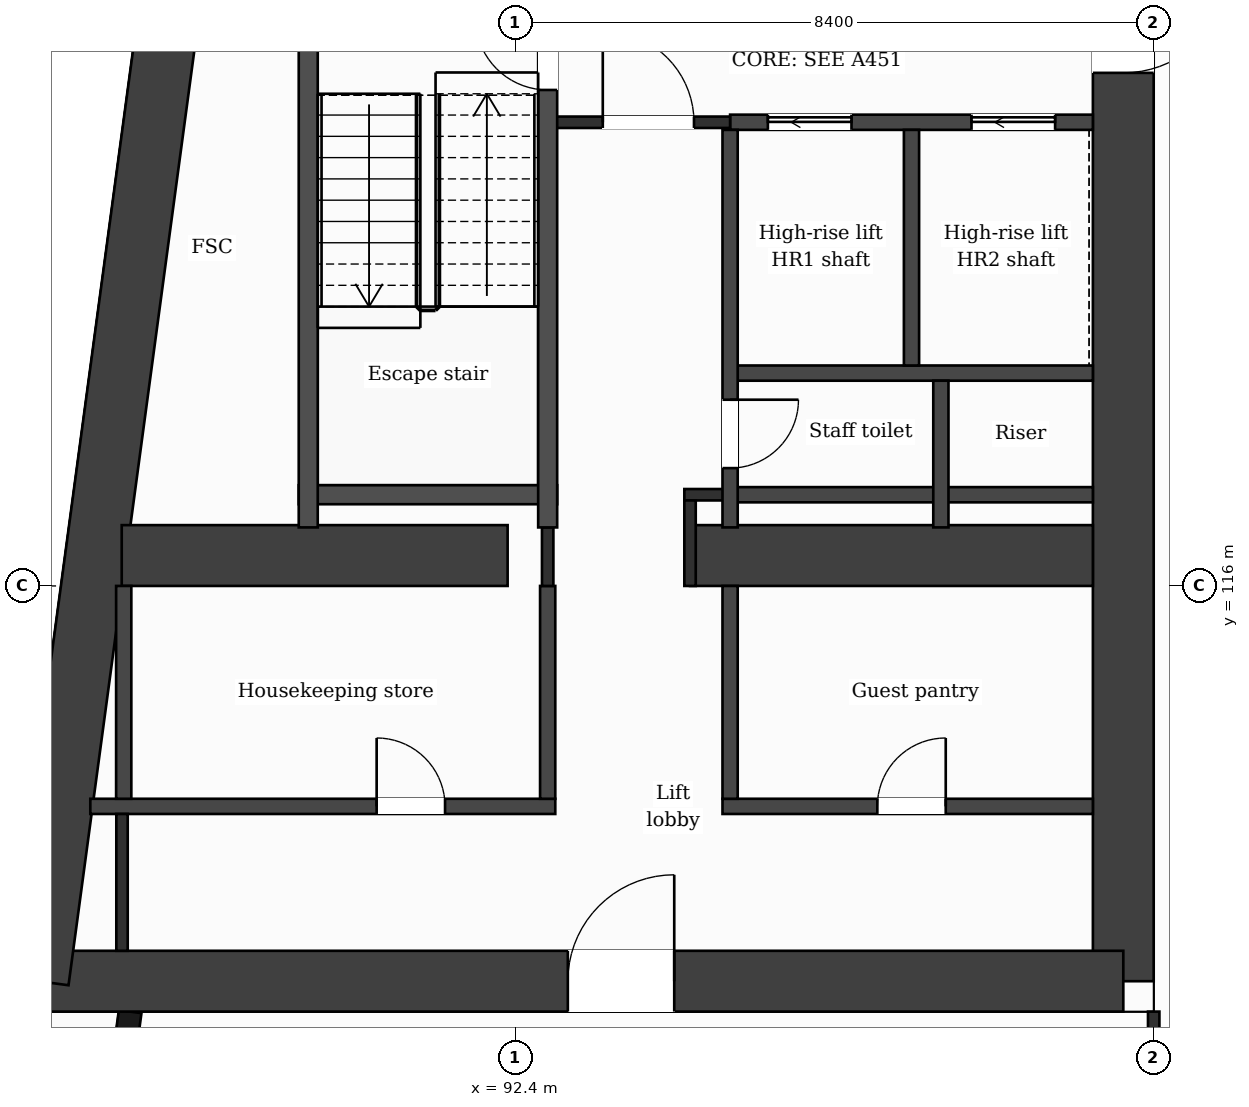
"""IFC4 building model, lengths in metres.
Left out: names, types, materials, properties, quantities, classifications, styles, units other than length and angle.
Written with IfcOpenShell. Run it as: python <this file> out.ifc"""

import sys

from ifc_helpers import new_model, si_unit, direction, frame, frame_2d, origin, place, context, subcontext, project, spatial, rectangle, extrude, element, fill, save


model = new_model("IFC4")
c1 = context("Model", 3, precision=1e-05, world=origin(), true_north=direction((0.0, 1.0)))
c2 = subcontext(c1, "Body", "Model", "MODEL_VIEW")
j1 = project(units=[si_unit("LENGTHUNIT", "METRE"), si_unit("PLANEANGLEUNIT", "RADIAN")], contexts=[c1])
p1 = place(None, origin())
s1 = spatial("IfcSite", under=j1, at=p1, CompositionType="ELEMENT")
p2 = place(p1, origin())
s2 = spatial("IfcBuilding", under=s1, at=p2, CompositionType="ELEMENT")
p3 = place(p2, frame((0.0, 0.0, 209.6)))
s3 = spatial("IfcBuildingStorey", under=s2, at=p3, CompositionType="ELEMENT", Elevation=209.6)
p4 = place(p3, frame((100.4, 132.0, 0.0), z_axis=(0.0, 0.0, 1.0), x_axis=(0.0, -1.0, 0.0)))
e1 = element("IfcWall", 1, at=p4, inside=s3, PredefinedType="SHEAR", context=c2, shape_type="SweptSolid", body=[
    extrude(rectangle(XDim=21.2, YDim=0.8, at=frame_2d((10.6, 0.0))), origin(), (0.0, 0.0, 1.0), 3.7),
])
p5 = place(p4, frame((7.85, 0.0, 0.0)))
e2 = element("IfcOpeningElement", 2, at=p5, cuts=e1, PredefinedType="OPENING", context=c2, shape_type="SweptSolid", body=[
    extrude(rectangle(XDim=1.4, YDim=2.1, at=frame_2d((0.7, 1.05))), frame((0.0, 0.41, 0.0), z_axis=(0.0, -1.0, 0.0), x_axis=(1.0, 0.0, 0.0)), (0.0, 0.0, 1.0), 0.82),
])
p6 = place(p3, frame((100.4, 110.8, 0.0), z_axis=(0.0, 0.0, 1.0), x_axis=(-1.0, 0.0, 0.0)))
e3 = element("IfcWall", 3, at=p6, inside=s3, PredefinedType="SHEAR", context=c2, shape_type="SweptSolid", body=[
    extrude(rectangle(XDim=14.273, YDim=0.8, at=frame_2d((7.137, 0.0))), origin(), (0.0, 0.0, 1.0), 3.7),
])
p7 = place(p6, frame((5.908, 0.0, 0.0)))
e4 = element("IfcOpeningElement", 4, at=p7, cuts=e3, PredefinedType="OPENING", context=c2, shape_type="SweptSolid", body=[
    extrude(rectangle(XDim=1.4, YDim=2.1, at=frame_2d((0.7, 1.05))), frame((0.0, 0.41, 0.0), z_axis=(0.0, -1.0, 0.0), x_axis=(1.0, 0.0, 0.0)), (0.0, 0.0, 1.0), 0.82),
])
p8 = place(p3, frame((86.127, 110.8, 0.0), z_axis=(0.0, 0.0, 1.0), x_axis=(0.133408347329, 0.991061154956, 0.0)))
e5 = element("IfcWall", 5, at=p8, inside=s3, PredefinedType="SHEAR", context=c2, shape_type="SweptSolid", body=[
    extrude(rectangle(XDim=21.391, YDim=0.8, at=frame_2d((10.696, 0.0))), origin(), (0.0, 0.0, 1.0), 3.7),
])
p9 = place(p3, frame((87.223, 116.4, 0.0), z_axis=(0.0, 0.0, 1.0), x_axis=(1.0, 0.0, 0.0)))
e6 = element("IfcWall", 6, at=p9, inside=s3, PredefinedType="SHEAR", context=c2, shape_type="SweptSolid", body=[
    extrude(rectangle(XDim=5.077, YDim=0.8, at=frame_2d((2.539, 0.0))), origin(), (0.0, 0.0, 1.0), 3.7),
])
p10 = place(p3, frame((94.7, 116.4, 0.0), z_axis=(0.0, 0.0, 1.0), x_axis=(1.0, 0.0, 0.0)))
e7 = element("IfcWall", 7, at=p10, inside=s3, PredefinedType="SHEAR", context=c2, shape_type="SweptSolid", body=[
    extrude(rectangle(XDim=5.3, YDim=0.8, at=frame_2d((2.65, 0.0))), origin(), (0.0, 0.0, 1.0), 3.7),
])
p11 = place(p3, frame((87.334, 110.4, 0.0), z_axis=(0.0, 0.0, 1.0), x_axis=(-0.133437175554, -0.991057273915, 0.0)))
e8 = element("IfcWall", 8, at=p11, inside=s3, PredefinedType="SOLIDWALL", context=c2, shape_type="SweptSolid", body=[
    extrude(rectangle(XDim=6.781, YDim=0.3, at=frame_2d((3.39, 0.0))), origin(), (0.0, 0.0, 1.0), 3.38),
])
p12 = place(p11, frame((1.418, 0.0, 0.0)))
e9 = element("IfcOpeningElement", 9, at=p12, cuts=e8, PredefinedType="OPENING", context=c2, shape_type="SweptSolid", body=[
    extrude(rectangle(XDim=1.2, YDim=2.4, at=frame_2d((0.6, 1.2))), frame((0.0, 0.16, 0.0), z_axis=(0.0, -1.0, 0.0), x_axis=(1.0, 0.0, 0.0)), (0.0, 0.0, 1.0), 0.32),
])
p13 = place(p11, frame((4.758, 0.0, 0.9)))
e10 = element("IfcOpeningElement", 10, at=p13, cuts=e8, PredefinedType="OPENING", context=c2, shape_type="SweptSolid", body=[
    extrude(rectangle(XDim=1.2, YDim=2.1, at=frame_2d((0.6, 1.05))), frame((0.0, 0.16, 0.0), z_axis=(0.0, -1.0, 0.0), x_axis=(1.0, 0.0, 0.0)), (0.0, 0.0, 1.0), 0.32),
])
p14 = place(p3, frame((86.81, 113.1, 0.0), z_axis=(0.0, 0.0, 1.0), x_axis=(1.0, 0.0, 0.0)))
e11 = element("IfcWall", 11, at=p14, inside=s3, PredefinedType="PARTITIONING", context=c2, shape_type="SweptSolid", body=[
    extrude(rectangle(XDim=6.117, YDim=0.2, at=frame_2d((3.059, 0.0))), origin(), (0.0, 0.0, 1.0), 3.38),
])
p15 = place(p14, frame((3.767, 0.0, 0.0)))
e12 = element("IfcOpeningElement", 12, at=p15, cuts=e11, PredefinedType="OPENING", context=c2, shape_type="SweptSolid", body=[
    extrude(rectangle(XDim=0.9, YDim=2.1, at=frame_2d((0.45, 1.05))), frame((0.0, 0.11, 0.0), z_axis=(0.0, -1.0, 0.0), x_axis=(1.0, 0.0, 0.0)), (0.0, 0.0, 1.0), 0.22),
])
p16 = place(p3, frame((95.127, 113.1, 0.0), z_axis=(0.0, 0.0, 1.0), x_axis=(1.0, 0.0, 0.0)))
e13 = element("IfcWall", 13, at=p16, inside=s3, PredefinedType="PARTITIONING", context=c2, shape_type="SweptSolid", body=[
    extrude(rectangle(XDim=4.873, YDim=0.2, at=frame_2d((2.437, 0.0))), origin(), (0.0, 0.0, 1.0), 3.38),
])
p17 = place(p16, frame((2.037, 0.0, 0.0)))
e14 = element("IfcOpeningElement", 14, at=p17, cuts=e13, PredefinedType="OPENING", context=c2, shape_type="SweptSolid", body=[
    extrude(rectangle(XDim=0.9, YDim=2.1, at=frame_2d((0.45, 1.05))), frame((0.0, 0.11, 0.0), z_axis=(0.0, -1.0, 0.0), x_axis=(1.0, 0.0, 0.0)), (0.0, 0.0, 1.0), 0.22),
])
p18 = place(p3, frame((95.227, 117.2, 0.0), z_axis=(0.0, 0.0, 1.0), x_axis=(1.0, 0.0, 0.0)))
e15 = element("IfcWall", 15, at=p18, inside=s3, PredefinedType="PARTITIONING", context=c2, shape_type="SweptSolid", body=[
    extrude(rectangle(XDim=4.773, YDim=0.2, at=frame_2d((2.386, 0.0))), origin(), (0.0, 0.0, 1.0), 3.38),
])
p19 = place(p3, frame((94.625, 117.2, 0.0), z_axis=(0.0, 0.0, 1.0), x_axis=(1.0, 0.0, 0.0)))
e16 = element("IfcWall", 16, at=p19, inside=s3, PredefinedType="PARTITIONING", context=c2, shape_type="SweptSolid", body=[
    extrude(rectangle(XDim=0.602, YDim=0.15, at=frame_2d((0.301, 0.0))), origin(), (0.0, 0.0, 1.0), 3.38),
])
p20 = place(p3, frame((89.552, 117.2, 0.0), z_axis=(0.0, 0.0, 1.0), x_axis=(1.0, 0.0, 0.0)))
e17 = element("IfcWall", 17, at=p20, inside=s3, PredefinedType="PARTITIONING", context=c2, shape_type="SweptSolid", body=[
    extrude(rectangle(XDim=3.4, YDim=0.25, at=frame_2d((1.7, 0.0))), origin(), (0.0, 0.0, 1.0), 3.38),
])
p21 = place(p3, frame((95.227, 118.8, 0.0), z_axis=(0.0, 0.0, 1.0), x_axis=(1.0, 0.0, 0.0)))
e18 = element("IfcWall", 18, at=p21, inside=s3, PredefinedType="PARTITIONING", context=c2, shape_type="SweptSolid", body=[
    extrude(rectangle(XDim=4.773, YDim=0.2, at=frame_2d((2.386, 0.0))), origin(), (0.0, 0.0, 1.0), 3.38),
])
p22 = place(p3, frame((95.227, 122.1, 0.0), z_axis=(0.0, 0.0, 1.0), x_axis=(1.0, 0.0, 0.0)))
e19 = element("IfcWall", 19, at=p22, inside=s3, PredefinedType="PARTITIONING", context=c2, shape_type="SweptSolid", body=[
    extrude(rectangle(XDim=4.773, YDim=0.2, at=frame_2d((2.386, 0.0))), origin(), (0.0, 0.0, 1.0), 3.38),
])
p23 = place(p22, frame((0.497, 0.0, 0.0)))
e20 = element("IfcOpeningElement", 20, at=p23, cuts=e19, PredefinedType="OPENING", context=c2, shape_type="SweptSolid", body=[
    extrude(rectangle(XDim=1.1, YDim=2.1, at=frame_2d((0.55, 1.05))), frame((0.0, 0.11, 0.0), z_axis=(0.0, -1.0, 0.0), x_axis=(1.0, 0.0, 0.0)), (0.0, 0.0, 1.0), 0.22),
])
p24 = place(p22, frame((3.176, 0.0, 0.0)))
e21 = element("IfcOpeningElement", 21, at=p24, cuts=e19, PredefinedType="OPENING", context=c2, shape_type="SweptSolid", body=[
    extrude(rectangle(XDim=1.1, YDim=2.1, at=frame_2d((0.55, 1.05))), frame((0.0, 0.11, 0.0), z_axis=(0.0, -1.0, 0.0), x_axis=(1.0, 0.0, 0.0)), (0.0, 0.0, 1.0), 0.22),
])
p25 = place(p3, frame((92.827, 122.1, 0.0), z_axis=(0.0, 0.0, 1.0), x_axis=(1.0, 0.0, 0.0)))
e22 = element("IfcWall", 22, at=p25, inside=s3, PredefinedType="PARTITIONING", context=c2, shape_type="SweptSolid", body=[
    extrude(rectangle(XDim=2.4, YDim=0.15, at=frame_2d((1.2, 0.0))), origin(), (0.0, 0.0, 1.0), 3.38),
])
p26 = place(p25, frame((0.725, 0.0, 0.0)))
e23 = element("IfcOpeningElement", 23, at=p26, cuts=e22, PredefinedType="OPENING", context=c2, shape_type="SweptSolid", body=[
    extrude(rectangle(XDim=1.2, YDim=2.1, at=frame_2d((0.6, 1.05))), frame((0.0, 0.085, 0.0), z_axis=(0.0, -1.0, 0.0), x_axis=(1.0, 0.0, 0.0)), (0.0, 0.0, 1.0), 0.17),
])
p27 = place(p3, frame((87.25, 113.2, 0.0), z_axis=(0.0, 0.0, 1.0), x_axis=(0.0, 1.0, 0.0)))
e24 = element("IfcWall", 24, at=p27, inside=s3, PredefinedType="PARTITIONING", context=c2, shape_type="SweptSolid", body=[
    extrude(rectangle(XDim=2.8, YDim=0.2, at=frame_2d((1.4, 0.0))), origin(), (0.0, 0.0, 1.0), 3.38),
])
p28 = place(p3, frame((87.227, 111.2, 0.0), z_axis=(0.0, 0.0, 1.0), x_axis=(0.0, 1.0, 0.0)))
e25 = element("IfcWall", 25, at=p28, inside=s3, PredefinedType="PARTITIONING", context=c2, shape_type="SweptSolid", body=[
    extrude(rectangle(XDim=1.8, YDim=0.15, at=frame_2d((0.9, 0.0))), origin(), (0.0, 0.0, 1.0), 3.38),
])
p29 = place(p3, frame((89.677, 116.77, 0.0), z_axis=(0.0, 0.0, 1.0), x_axis=(0.0, 1.0, 0.0)))
e26 = element("IfcWall", 26, at=p29, inside=s3, PredefinedType="PARTITIONING", context=c2, shape_type="SweptSolid", body=[
    extrude(rectangle(XDim=7.055, YDim=0.25, at=frame_2d((3.527, 0.0))), origin(), (0.0, 0.0, 1.0), 3.38),
])
p30 = place(p3, frame((92.827, 113.2, 0.0), z_axis=(0.0, 0.0, 1.0), x_axis=(0.0, 1.0, 0.0)))
e27 = element("IfcWall", 27, at=p30, inside=s3, PredefinedType="PARTITIONING", context=c2, shape_type="SweptSolid", body=[
    extrude(rectangle(XDim=2.8, YDim=0.2, at=frame_2d((1.4, 0.0))), origin(), (0.0, 0.0, 1.0), 3.38),
])
p31 = place(p3, frame((92.827, 116.0, 0.0), z_axis=(0.0, 0.0, 1.0), x_axis=(0.0, 1.0, 0.0)))
e28 = element("IfcWall", 28, at=p31, inside=s3, PredefinedType="PARTITIONING", context=c2, shape_type="SweptSolid", body=[
    extrude(rectangle(XDim=0.77, YDim=0.15, at=frame_2d((0.385, 0.0))), origin(), (0.0, 0.0, 1.0), 3.38),
])
p32 = place(p3, frame((92.827, 116.77, 0.0), z_axis=(0.0, 0.0, 1.0), x_axis=(0.0, 1.0, 0.0)))
e29 = element("IfcWall", 29, at=p32, inside=s3, PredefinedType="PARTITIONING", context=c2, shape_type="SweptSolid", body=[
    extrude(rectangle(XDim=7.055, YDim=0.25, at=frame_2d((3.527, 0.0))), origin(), (0.0, 0.0, 1.0), 3.38),
])
p33 = place(p32, frame((5.755, 0.0, 0.0)))
e30 = element("IfcOpeningElement", 30, at=p33, cuts=e29, PredefinedType="OPENING", context=c2, shape_type="SweptSolid", body=[
    extrude(rectangle(XDim=0.95, YDim=2.1, at=frame_2d((0.475, 1.05))), frame((0.0, 0.135, 0.0), z_axis=(0.0, -1.0, 0.0), x_axis=(1.0, 0.0, 0.0)), (0.0, 0.0, 1.0), 0.27),
])
p34 = place(p3, frame((94.7, 116.0, 0.0), z_axis=(0.0, 0.0, 1.0), x_axis=(0.0, 1.0, 0.0)))
e31 = element("IfcWall", 31, at=p34, inside=s3, PredefinedType="PARTITIONING", context=c2, shape_type="SweptSolid", body=[
    extrude(rectangle(XDim=1.125, YDim=0.15, at=frame_2d((0.562, 0.0))), origin(), (0.0, 0.0, 1.0), 3.38),
])
p35 = place(p3, frame((95.227, 113.2, 0.0), z_axis=(0.0, 0.0, 1.0), x_axis=(0.0, 1.0, 0.0)))
e32 = element("IfcWall", 32, at=p35, inside=s3, PredefinedType="PARTITIONING", context=c2, shape_type="SweptSolid", body=[
    extrude(rectangle(XDim=2.8, YDim=0.2, at=frame_2d((1.4, 0.0))), origin(), (0.0, 0.0, 1.0), 3.38),
])
p36 = place(p3, frame((95.227, 116.77, 0.0), z_axis=(0.0, 0.0, 1.0), x_axis=(0.0, 1.0, 0.0)))
e33 = element("IfcWall", 33, at=p36, inside=s3, PredefinedType="PARTITIONING", context=c2, shape_type="SweptSolid", body=[
    extrude(rectangle(XDim=5.23, YDim=0.2, at=frame_2d((2.615, 0.0))), origin(), (0.0, 0.0, 1.0), 3.38),
])
p37 = place(p36, frame((0.78, 0.0, 0.0)))
e34 = element("IfcOpeningElement", 34, at=p37, cuts=e33, PredefinedType="OPENING", context=c2, shape_type="SweptSolid", body=[
    extrude(rectangle(XDim=0.9, YDim=2.1, at=frame_2d((0.45, 1.05))), frame((0.0, 0.11, 0.0), z_axis=(0.0, -1.0, 0.0), x_axis=(1.0, 0.0, 0.0)), (0.0, 0.0, 1.0), 0.22),
])
p38 = place(p3, frame((97.614, 118.9, 0.0), z_axis=(0.0, 0.0, 1.0), x_axis=(0.0, 1.0, 0.0)))
e35 = element("IfcWall", 35, at=p38, inside=s3, PredefinedType="PARTITIONING", context=c2, shape_type="SweptSolid", body=[
    extrude(rectangle(XDim=3.1, YDim=0.2, at=frame_2d((1.55, 0.0))), origin(), (0.0, 0.0, 1.0), 3.38),
])
p39 = place(p3, frame((98.0, 116.77, 0.0), z_axis=(0.0, 0.0, 1.0), x_axis=(0.0, 1.0, 0.0)))
e36 = element("IfcWall", 36, at=p39, inside=s3, PredefinedType="PARTITIONING", context=c2, shape_type="SweptSolid", body=[
    extrude(rectangle(XDim=1.93, YDim=0.2, at=frame_2d((0.965, 0.0))), origin(), (0.0, 0.0, 1.0), 3.38),
])
p40 = place(p3, frame((100.8, 109.075, 0.0), z_axis=(0.0, 0.0, 1.0), x_axis=(0.0, 1.0, 0.0)))
e37 = element("IfcWall", 37, at=p40, inside=s3, PredefinedType="PARTITIONING", context=c2, shape_type="SweptSolid", body=[
    extrude(rectangle(XDim=1.325, YDim=0.15, at=frame_2d((0.663, 0.0))), origin(), (0.0, 0.0, 1.0), 3.38),
])
p41 = place(p26, origin())
e38 = element("IfcDoor", 38, at=p41, inside=s3, OperationType="SINGLE_SWING_LEFT", PredefinedType="DOOR", context=c2, shape_type="SweptSolid", body=[
    extrude(rectangle(XDim=1.2, YDim=2.1, at=frame_2d((0.6, 1.05))), frame((0.0, 0.025, 0.0), z_axis=(0.0, -1.0, 0.0), x_axis=(1.0, 0.0, 0.0)), (0.0, 0.0, 1.0), 0.05),
])
fill(e23, e38)
p42 = place(p23, origin())
e39 = element("IfcDoor", 39, at=p42, inside=s3, OperationType="SLIDING_TO_LEFT", PredefinedType="DOOR", context=c2, shape_type="SweptSolid", body=[
    extrude(rectangle(XDim=1.1, YDim=2.1, at=frame_2d((0.55, 1.05))), frame((0.0, 0.025, 0.0), z_axis=(0.0, -1.0, 0.0), x_axis=(1.0, 0.0, 0.0)), (0.0, 0.0, 1.0), 0.05),
])
fill(e20, e39)
p43 = place(p24, origin())
e40 = element("IfcDoor", 40, at=p43, inside=s3, OperationType="SLIDING_TO_LEFT", PredefinedType="DOOR", context=c2, shape_type="SweptSolid", body=[
    extrude(rectangle(XDim=1.1, YDim=2.1, at=frame_2d((0.55, 1.05))), frame((0.0, 0.025, 0.0), z_axis=(0.0, -1.0, 0.0), x_axis=(1.0, 0.0, 0.0)), (0.0, 0.0, 1.0), 0.05),
])
fill(e21, e40)
p44 = place(p33, origin())
e41 = element("IfcDoor", 41, at=p44, inside=s3, OperationType="SINGLE_SWING_RIGHT", PredefinedType="DOOR", context=c2, shape_type="SweptSolid", body=[
    extrude(rectangle(XDim=0.95, YDim=2.1, at=frame_2d((0.475, 1.05))), frame((0.0, 0.025, 0.0), z_axis=(0.0, -1.0, 0.0), x_axis=(1.0, 0.0, 0.0)), (0.0, 0.0, 1.0), 0.05),
])
fill(e30, e41)
p45 = place(p37, origin())
e42 = element("IfcDoor", 42, at=p45, inside=s3, OperationType="SINGLE_SWING_RIGHT", PredefinedType="DOOR", context=c2, shape_type="SweptSolid", body=[
    extrude(rectangle(XDim=0.9, YDim=2.1, at=frame_2d((0.45, 1.05))), frame((0.0, 0.025, 0.0), z_axis=(0.0, -1.0, 0.0), x_axis=(1.0, 0.0, 0.0)), (0.0, 0.0, 1.0), 0.05),
])
fill(e34, e42)
p46 = place(p15, origin())
e43 = element("IfcDoor", 43, at=p46, inside=s3, OperationType="SINGLE_SWING_LEFT", PredefinedType="DOOR", context=c2, shape_type="SweptSolid", body=[
    extrude(rectangle(XDim=0.9, YDim=2.1, at=frame_2d((0.45, 1.05))), frame((0.0, 0.025, 0.0), z_axis=(0.0, -1.0, 0.0), x_axis=(1.0, 0.0, 0.0)), (0.0, 0.0, 1.0), 0.05),
])
fill(e12, e43)
p47 = place(p17, origin())
e44 = element("IfcDoor", 44, at=p47, inside=s3, OperationType="SINGLE_SWING_RIGHT", PredefinedType="DOOR", context=c2, shape_type="SweptSolid", body=[
    extrude(rectangle(XDim=0.9, YDim=2.1, at=frame_2d((0.45, 1.05))), frame((0.0, 0.025, 0.0), z_axis=(0.0, -1.0, 0.0), x_axis=(1.0, 0.0, 0.0)), (0.0, 0.0, 1.0), 0.05),
])
fill(e14, e44)
p48 = place(p7, origin())
e45 = element("IfcDoor", 45, at=p48, inside=s3, OperationType="SINGLE_SWING_LEFT", PredefinedType="DOOR", context=c2, shape_type="SweptSolid", body=[
    extrude(rectangle(XDim=1.4, YDim=2.1, at=frame_2d((0.7, 1.05))), frame((0.0, 0.025, 0.0), z_axis=(0.0, -1.0, 0.0), x_axis=(1.0, 0.0, 0.0)), (0.0, 0.0, 1.0), 0.05),
])
fill(e4, e45)
p49 = place(p5, origin())
e46 = element("IfcDoor", 46, at=p49, inside=s3, OperationType="SINGLE_SWING_LEFT", PredefinedType="DOOR", context=c2, shape_type="SweptSolid", body=[
    extrude(rectangle(XDim=1.4, YDim=2.1, at=frame_2d((0.7, 1.05))), frame((0.0, 0.025, 0.0), z_axis=(0.0, -1.0, 0.0), x_axis=(1.0, 0.0, 0.0)), (0.0, 0.0, 1.0), 0.05),
])
fill(e2, e46)
save(model, sys.argv[1])
